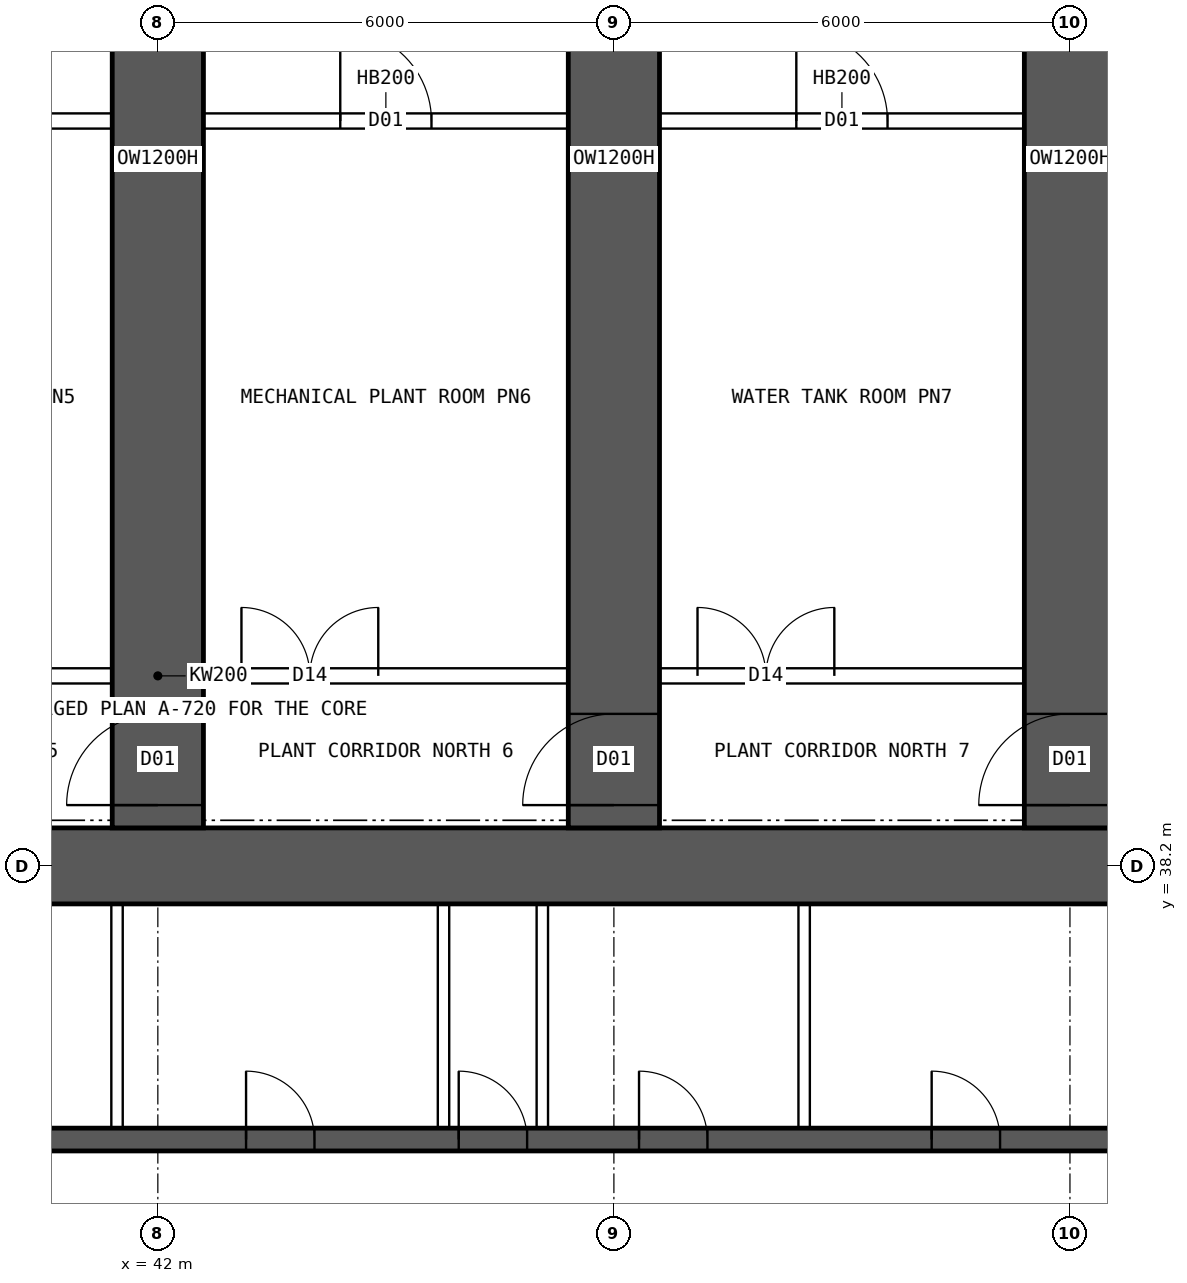
"""IFC4 building model, lengths in metres.
Left out: names, types, materials, properties, quantities, classifications, styles, units other than length and angle.
Written with IfcOpenShell. Run it as: python <this file> out.ifc"""

import sys

from ifc_helpers import new_model, si_unit, direction, frame, frame_2d, origin, place, context, subcontext, project, spatial, rectangle, extrude, element, fill, save


model = new_model("IFC4")
c1 = context("Model", 3, precision=1e-05, world=origin(), true_north=direction((0.0, 1.0)))
c2 = subcontext(c1, "Body", "Model", "MODEL_VIEW")
j1 = project(units=[si_unit("LENGTHUNIT", "METRE"), si_unit("PLANEANGLEUNIT", "RADIAN")], contexts=[c1])
p1 = place(None, origin())
s1 = spatial("IfcSite", under=j1, at=p1, CompositionType="ELEMENT")
p2 = place(p1, origin())
s2 = spatial("IfcBuilding", under=s1, at=p2, CompositionType="ELEMENT")
p3 = place(p2, frame((0.0, 0.0, 68.95)))
s3 = spatial("IfcBuildingStorey", under=s2, at=p3, CompositionType="ELEMENT", Elevation=68.95)
p4 = place(p3, frame((18.0, 38.2, 0.0), z_axis=(0.0, 0.0, 1.0), x_axis=(1.0, 0.0, 0.0)))
e1 = element("IfcWall", 1, at=p4, inside=s3, PredefinedType="SHEAR", context=c2, shape_type="SweptSolid", body=[
    extrude(rectangle(XDim=48.0, YDim=1.0, at=frame_2d((24.0, 0.0))), origin(), (0.0, 0.0, 1.0), 7.2),
])
p5 = place(p3, frame((18.5, 34.6, 0.0), z_axis=(0.0, 0.0, 1.0), x_axis=(1.0, 0.0, 0.0)))
e2 = element("IfcWall", 2, at=p5, inside=s3, PredefinedType="SHEAR", context=c2, shape_type="SweptSolid", body=[
    extrude(rectangle(XDim=47.0, YDim=0.3, at=frame_2d((23.5, 0.0))), origin(), (0.0, 0.0, 1.0), 7.2),
])
p6 = place(p5, frame((0.9, 0.0, 0.0)))
e3 = element("IfcOpeningElement", 3, at=p6, cuts=e2, PredefinedType="OPENING", context=c2, shape_type="SweptSolid", body=[
    extrude(rectangle(XDim=1.1, YDim=2.1, at=frame_2d((0.55, 1.05))), frame((0.0, 0.16, 0.0), z_axis=(0.0, -1.0, 0.0), x_axis=(1.0, 0.0, 0.0)), (0.0, 0.0, 1.0), 0.32),
])
p7 = place(p5, frame((45.0, 0.0, 0.0)))
e4 = element("IfcOpeningElement", 4, at=p7, cuts=e2, PredefinedType="OPENING", context=c2, shape_type="SweptSolid", body=[
    extrude(rectangle(XDim=1.1, YDim=2.1, at=frame_2d((0.55, 1.05))), frame((0.0, 0.16, 0.0), z_axis=(0.0, -1.0, 0.0), x_axis=(1.0, 0.0, 0.0)), (0.0, 0.0, 1.0), 0.32),
])
p8 = place(p5, frame((4.1, 0.0, 0.0)))
e5 = element("IfcOpeningElement", 5, at=p8, cuts=e2, PredefinedType="OPENING", context=c2, shape_type="SweptSolid", body=[
    extrude(rectangle(XDim=0.9, YDim=2.1, at=frame_2d((0.45, 1.05))), frame((0.0, 0.16, 0.0), z_axis=(0.0, -1.0, 0.0), x_axis=(1.0, 0.0, 0.0)), (0.0, 0.0, 1.0), 0.32),
])
p9 = place(p5, frame((42.0, 0.0, 0.0)))
e6 = element("IfcOpeningElement", 6, at=p9, cuts=e2, PredefinedType="OPENING", context=c2, shape_type="SweptSolid", body=[
    extrude(rectangle(XDim=0.9, YDim=2.1, at=frame_2d((0.45, 1.05))), frame((0.0, 0.16, 0.0), z_axis=(0.0, -1.0, 0.0), x_axis=(1.0, 0.0, 0.0)), (0.0, 0.0, 1.0), 0.32),
])
p10 = place(p5, frame((8.875, 0.0, 0.0)))
e7 = element("IfcOpeningElement", 7, at=p10, cuts=e2, PredefinedType="OPENING", context=c2, shape_type="SweptSolid", body=[
    extrude(rectangle(XDim=0.9, YDim=2.1, at=frame_2d((0.45, 1.05))), frame((0.0, 0.16, 0.0), z_axis=(0.0, -1.0, 0.0), x_axis=(1.0, 0.0, 0.0)), (0.0, 0.0, 1.0), 0.32),
])
p11 = place(p5, frame((12.849, 0.0, 0.0)))
e8 = element("IfcOpeningElement", 8, at=p11, cuts=e2, PredefinedType="OPENING", context=c2, shape_type="SweptSolid", body=[
    extrude(rectangle(XDim=0.9, YDim=2.1, at=frame_2d((0.45, 1.05))), frame((0.0, 0.16, 0.0), z_axis=(0.0, -1.0, 0.0), x_axis=(1.0, 0.0, 0.0)), (0.0, 0.0, 1.0), 0.32),
])
p12 = place(p5, frame((16.496, 0.0, 0.0)))
e9 = element("IfcOpeningElement", 9, at=p12, cuts=e2, PredefinedType="OPENING", context=c2, shape_type="SweptSolid", body=[
    extrude(rectangle(XDim=0.9, YDim=2.1, at=frame_2d((0.45, 1.05))), frame((0.0, 0.16, 0.0), z_axis=(0.0, -1.0, 0.0), x_axis=(1.0, 0.0, 0.0)), (0.0, 0.0, 1.0), 0.32),
])
p13 = place(p5, frame((20.255, 0.0, 0.0)))
e10 = element("IfcOpeningElement", 10, at=p13, cuts=e2, PredefinedType="OPENING", context=c2, shape_type="SweptSolid", body=[
    extrude(rectangle(XDim=0.9, YDim=2.1, at=frame_2d((0.45, 1.05))), frame((0.0, 0.16, 0.0), z_axis=(0.0, -1.0, 0.0), x_axis=(1.0, 0.0, 0.0)), (0.0, 0.0, 1.0), 0.32),
])
p14 = place(p5, frame((24.661, 0.0, 0.0)))
e11 = element("IfcOpeningElement", 11, at=p14, cuts=e2, PredefinedType="OPENING", context=c2, shape_type="SweptSolid", body=[
    extrude(rectangle(XDim=0.9, YDim=2.1, at=frame_2d((0.45, 1.05))), frame((0.0, 0.16, 0.0), z_axis=(0.0, -1.0, 0.0), x_axis=(1.0, 0.0, 0.0)), (0.0, 0.0, 1.0), 0.32),
])
p15 = place(p5, frame((27.458, 0.0, 0.0)))
e12 = element("IfcOpeningElement", 12, at=p15, cuts=e2, PredefinedType="OPENING", context=c2, shape_type="SweptSolid", body=[
    extrude(rectangle(XDim=0.9, YDim=2.1, at=frame_2d((0.45, 1.05))), frame((0.0, 0.16, 0.0), z_axis=(0.0, -1.0, 0.0), x_axis=(1.0, 0.0, 0.0)), (0.0, 0.0, 1.0), 0.32),
])
p16 = place(p5, frame((29.831, 0.0, 0.0)))
e13 = element("IfcOpeningElement", 13, at=p16, cuts=e2, PredefinedType="OPENING", context=c2, shape_type="SweptSolid", body=[
    extrude(rectangle(XDim=0.9, YDim=2.1, at=frame_2d((0.45, 1.05))), frame((0.0, 0.16, 0.0), z_axis=(0.0, -1.0, 0.0), x_axis=(1.0, 0.0, 0.0)), (0.0, 0.0, 1.0), 0.32),
])
p17 = place(p5, frame((33.68, 0.0, 0.0)))
e14 = element("IfcOpeningElement", 14, at=p17, cuts=e2, PredefinedType="OPENING", context=c2, shape_type="SweptSolid", body=[
    extrude(rectangle(XDim=0.9, YDim=2.1, at=frame_2d((0.45, 1.05))), frame((0.0, 0.16, 0.0), z_axis=(0.0, -1.0, 0.0), x_axis=(1.0, 0.0, 0.0)), (0.0, 0.0, 1.0), 0.32),
])
p18 = place(p5, frame((37.429, 0.0, 0.0)))
e15 = element("IfcOpeningElement", 15, at=p18, cuts=e2, PredefinedType="OPENING", context=c2, shape_type="SweptSolid", body=[
    extrude(rectangle(XDim=0.9, YDim=2.1, at=frame_2d((0.45, 1.05))), frame((0.0, 0.16, 0.0), z_axis=(0.0, -1.0, 0.0), x_axis=(1.0, 0.0, 0.0)), (0.0, 0.0, 1.0), 0.32),
])
p19 = place(p3, frame((42.0, 38.7, 0.0), z_axis=(0.0, 0.0, 1.0), x_axis=(0.0, 1.0, 0.0)))
e16 = element("IfcWall", 16, at=p19, inside=s3, PredefinedType="SHEAR", context=c2, shape_type="SweptSolid", body=[
    extrude(rectangle(XDim=17.6, YDim=1.2, at=frame_2d((8.8, 0.0))), origin(), (0.0, 0.0, 1.0), 7.2),
])
p20 = place(p19, frame((0.3, 0.0, 0.0)))
e17 = element("IfcOpeningElement", 17, at=p20, cuts=e16, PredefinedType="OPENING", context=c2, shape_type="SweptSolid", body=[
    extrude(rectangle(XDim=1.2, YDim=2.1, at=frame_2d((0.6, 1.05))), frame((0.0, 0.61, 0.0), z_axis=(0.0, -1.0, 0.0), x_axis=(1.0, 0.0, 0.0)), (0.0, 0.0, 1.0), 1.22),
])
p21 = place(p3, frame((48.0, 38.7, 0.0), z_axis=(0.0, 0.0, 1.0), x_axis=(0.0, 1.0, 0.0)))
e18 = element("IfcWall", 18, at=p21, inside=s3, PredefinedType="SHEAR", context=c2, shape_type="SweptSolid", body=[
    extrude(rectangle(XDim=17.6, YDim=1.2, at=frame_2d((8.8, 0.0))), origin(), (0.0, 0.0, 1.0), 7.2),
])
p22 = place(p21, frame((0.3, 0.0, 0.0)))
e19 = element("IfcOpeningElement", 19, at=p22, cuts=e18, PredefinedType="OPENING", context=c2, shape_type="SweptSolid", body=[
    extrude(rectangle(XDim=1.2, YDim=2.1, at=frame_2d((0.6, 1.05))), frame((0.0, 0.61, 0.0), z_axis=(0.0, -1.0, 0.0), x_axis=(1.0, 0.0, 0.0)), (0.0, 0.0, 1.0), 1.22),
])
p23 = place(p3, frame((54.0, 38.7, 0.0), z_axis=(0.0, 0.0, 1.0), x_axis=(0.0, 1.0, 0.0)))
e20 = element("IfcWall", 20, at=p23, inside=s3, PredefinedType="SHEAR", context=c2, shape_type="SweptSolid", body=[
    extrude(rectangle(XDim=17.6, YDim=1.2, at=frame_2d((8.8, 0.0))), origin(), (0.0, 0.0, 1.0), 7.2),
])
p24 = place(p23, frame((0.3, 0.0, 0.0)))
e21 = element("IfcOpeningElement", 21, at=p24, cuts=e20, PredefinedType="OPENING", context=c2, shape_type="SweptSolid", body=[
    extrude(rectangle(XDim=1.2, YDim=2.1, at=frame_2d((0.6, 1.05))), frame((0.0, 0.61, 0.0), z_axis=(0.0, -1.0, 0.0), x_axis=(1.0, 0.0, 0.0)), (0.0, 0.0, 1.0), 1.22),
])
for number, where, z_axis, x_axis in (
    (22, (41.463, 34.75, 0.0), (0.0, 0.0, 1.0), (0.0, 1.0, 0.0)),
    (23, (45.758, 34.75, 0.0), (0.0, 0.0, 1.0), (0.0, 1.0, 0.0)),
    (24, (47.058, 34.75, 0.0), (0.0, 0.0, 1.0), (0.0, 1.0, 0.0)),
    (25, (50.503, 34.75, 0.0), (0.0, 0.0, 1.0), (0.0, 1.0, 0.0)),
):
    element("IfcWall", number, at=place(p3, frame(where, z_axis=z_axis, x_axis=x_axis)), inside=s3, PredefinedType="SOLIDWALL", context=c2, shape_type="SweptSolid", body=[
        extrude(rectangle(XDim=2.95, YDim=0.15, at=frame_2d((1.475, 0.0))), origin(), (0.0, 0.0, 1.0), 6.9),
    ])
p25 = place(p3, frame((15.6, 40.7, 0.0), z_axis=(0.0, 0.0, 1.0), x_axis=(1.0, 0.0, 0.0)))
e26 = element("IfcWall", 26, at=p25, inside=s3, PredefinedType="SOLIDWALL", context=c2, shape_type="SweptSolid", body=[
    extrude(rectangle(XDim=52.8, YDim=0.2, at=frame_2d((26.4, 0.0))), origin(), (0.0, 0.0, 1.0), 6.9),
])
p26 = place(p25, frame((0.6, 0.0, 0.0)))
e27 = element("IfcOpeningElement", 27, at=p26, cuts=e26, PredefinedType="OPENING", context=c2, shape_type="SweptSolid", body=[
    extrude(rectangle(XDim=1.2, YDim=2.1, at=frame_2d((0.6, 1.05))), frame((0.0, 0.11, 0.0), z_axis=(0.0, -1.0, 0.0), x_axis=(1.0, 0.0, 0.0)), (0.0, 0.0, 1.0), 0.22),
])
p27 = place(p25, frame((3.5, 0.0, 0.0)))
e28 = element("IfcOpeningElement", 28, at=p27, cuts=e26, PredefinedType="OPENING", context=c2, shape_type="SweptSolid", body=[
    extrude(rectangle(XDim=1.8, YDim=2.4, at=frame_2d((0.9, 1.2))), frame((0.0, 0.11, 0.0), z_axis=(0.0, -1.0, 0.0), x_axis=(1.0, 0.0, 0.0)), (0.0, 0.0, 1.0), 0.22),
])
p28 = place(p25, frame((9.5, 0.0, 0.0)))
e29 = element("IfcOpeningElement", 29, at=p28, cuts=e26, PredefinedType="OPENING", context=c2, shape_type="SweptSolid", body=[
    extrude(rectangle(XDim=1.8, YDim=2.4, at=frame_2d((0.9, 1.2))), frame((0.0, 0.11, 0.0), z_axis=(0.0, -1.0, 0.0), x_axis=(1.0, 0.0, 0.0)), (0.0, 0.0, 1.0), 0.22),
])
p29 = place(p25, frame((15.5, 0.0, 0.0)))
e30 = element("IfcOpeningElement", 30, at=p29, cuts=e26, PredefinedType="OPENING", context=c2, shape_type="SweptSolid", body=[
    extrude(rectangle(XDim=1.8, YDim=2.4, at=frame_2d((0.9, 1.2))), frame((0.0, 0.11, 0.0), z_axis=(0.0, -1.0, 0.0), x_axis=(1.0, 0.0, 0.0)), (0.0, 0.0, 1.0), 0.22),
])
p30 = place(p25, frame((21.5, 0.0, 0.0)))
e31 = element("IfcOpeningElement", 31, at=p30, cuts=e26, PredefinedType="OPENING", context=c2, shape_type="SweptSolid", body=[
    extrude(rectangle(XDim=1.8, YDim=2.4, at=frame_2d((0.9, 1.2))), frame((0.0, 0.11, 0.0), z_axis=(0.0, -1.0, 0.0), x_axis=(1.0, 0.0, 0.0)), (0.0, 0.0, 1.0), 0.22),
])
p31 = place(p25, frame((27.5, 0.0, 0.0)))
e32 = element("IfcOpeningElement", 32, at=p31, cuts=e26, PredefinedType="OPENING", context=c2, shape_type="SweptSolid", body=[
    extrude(rectangle(XDim=1.8, YDim=2.4, at=frame_2d((0.9, 1.2))), frame((0.0, 0.11, 0.0), z_axis=(0.0, -1.0, 0.0), x_axis=(1.0, 0.0, 0.0)), (0.0, 0.0, 1.0), 0.22),
])
p32 = place(p25, frame((33.5, 0.0, 0.0)))
e33 = element("IfcOpeningElement", 33, at=p32, cuts=e26, PredefinedType="OPENING", context=c2, shape_type="SweptSolid", body=[
    extrude(rectangle(XDim=1.8, YDim=2.4, at=frame_2d((0.9, 1.2))), frame((0.0, 0.11, 0.0), z_axis=(0.0, -1.0, 0.0), x_axis=(1.0, 0.0, 0.0)), (0.0, 0.0, 1.0), 0.22),
])
p33 = place(p25, frame((39.5, 0.0, 0.0)))
e34 = element("IfcOpeningElement", 34, at=p33, cuts=e26, PredefinedType="OPENING", context=c2, shape_type="SweptSolid", body=[
    extrude(rectangle(XDim=1.8, YDim=2.4, at=frame_2d((0.9, 1.2))), frame((0.0, 0.11, 0.0), z_axis=(0.0, -1.0, 0.0), x_axis=(1.0, 0.0, 0.0)), (0.0, 0.0, 1.0), 0.22),
])
p34 = place(p25, frame((45.5, 0.0, 0.0)))
e35 = element("IfcOpeningElement", 35, at=p34, cuts=e26, PredefinedType="OPENING", context=c2, shape_type="SweptSolid", body=[
    extrude(rectangle(XDim=1.8, YDim=2.4, at=frame_2d((0.9, 1.2))), frame((0.0, 0.11, 0.0), z_axis=(0.0, -1.0, 0.0), x_axis=(1.0, 0.0, 0.0)), (0.0, 0.0, 1.0), 0.22),
])
p35 = place(p25, frame((51.5, 0.0, 0.0)))
e36 = element("IfcOpeningElement", 36, at=p35, cuts=e26, PredefinedType="OPENING", context=c2, shape_type="SweptSolid", body=[
    extrude(rectangle(XDim=1.2, YDim=2.1, at=frame_2d((0.6, 1.05))), frame((0.0, 0.11, 0.0), z_axis=(0.0, -1.0, 0.0), x_axis=(1.0, 0.0, 0.0)), (0.0, 0.0, 1.0), 0.22),
])
p36 = place(p3, frame((36.5, 48.0, 0.0), z_axis=(0.0, 0.0, 1.0), x_axis=(1.0, 0.0, 0.0)))
e37 = element("IfcWall", 37, at=p36, inside=s3, PredefinedType="SOLIDWALL", context=c2, shape_type="SweptSolid", body=[
    extrude(rectangle(XDim=5.0, YDim=0.2, at=frame_2d((2.5, 0.0))), origin(), (0.0, 0.0, 1.0), 6.9),
])
p37 = place(p36, frame((1.9, 0.0, 0.0)))
e38 = element("IfcOpeningElement", 38, at=p37, cuts=e37, PredefinedType="OPENING", context=c2, shape_type="SweptSolid", body=[
    extrude(rectangle(XDim=1.2, YDim=2.1, at=frame_2d((0.6, 1.05))), frame((0.0, 0.11, 0.0), z_axis=(0.0, -1.0, 0.0), x_axis=(1.0, 0.0, 0.0)), (0.0, 0.0, 1.0), 0.22),
])
p38 = place(p3, frame((42.5, 48.0, 0.0), z_axis=(0.0, 0.0, 1.0), x_axis=(1.0, 0.0, 0.0)))
e39 = element("IfcWall", 39, at=p38, inside=s3, PredefinedType="SOLIDWALL", context=c2, shape_type="SweptSolid", body=[
    extrude(rectangle(XDim=5.0, YDim=0.2, at=frame_2d((2.5, 0.0))), origin(), (0.0, 0.0, 1.0), 6.9),
])
p39 = place(p38, frame((1.9, 0.0, 0.0)))
e40 = element("IfcOpeningElement", 40, at=p39, cuts=e39, PredefinedType="OPENING", context=c2, shape_type="SweptSolid", body=[
    extrude(rectangle(XDim=1.2, YDim=2.1, at=frame_2d((0.6, 1.05))), frame((0.0, 0.11, 0.0), z_axis=(0.0, -1.0, 0.0), x_axis=(1.0, 0.0, 0.0)), (0.0, 0.0, 1.0), 0.22),
])
p40 = place(p3, frame((48.5, 48.0, 0.0), z_axis=(0.0, 0.0, 1.0), x_axis=(1.0, 0.0, 0.0)))
e41 = element("IfcWall", 41, at=p40, inside=s3, PredefinedType="SOLIDWALL", context=c2, shape_type="SweptSolid", body=[
    extrude(rectangle(XDim=5.0, YDim=0.2, at=frame_2d((2.5, 0.0))), origin(), (0.0, 0.0, 1.0), 6.9),
])
p41 = place(p40, frame((1.9, 0.0, 0.0)))
e42 = element("IfcOpeningElement", 42, at=p41, cuts=e41, PredefinedType="OPENING", context=c2, shape_type="SweptSolid", body=[
    extrude(rectangle(XDim=1.2, YDim=2.1, at=frame_2d((0.6, 1.05))), frame((0.0, 0.11, 0.0), z_axis=(0.0, -1.0, 0.0), x_axis=(1.0, 0.0, 0.0)), (0.0, 0.0, 1.0), 0.22),
])
p42 = place(p14, origin())
e43 = element("IfcDoor", 43, at=p42, inside=s3, OperationType="SINGLE_SWING_LEFT", PredefinedType="DOOR", context=c2, shape_type="SweptSolid", body=[
    extrude(rectangle(XDim=0.9, YDim=2.1, at=frame_2d((0.45, 1.05))), frame((0.0, 0.025, 0.0), z_axis=(0.0, -1.0, 0.0), x_axis=(1.0, 0.0, 0.0)), (0.0, 0.0, 1.0), 0.05),
])
fill(e11, e43)
p43 = place(p15, origin())
e44 = element("IfcDoor", 44, at=p43, inside=s3, OperationType="SINGLE_SWING_LEFT", PredefinedType="DOOR", context=c2, shape_type="SweptSolid", body=[
    extrude(rectangle(XDim=0.9, YDim=2.1, at=frame_2d((0.45, 1.05))), frame((0.0, 0.025, 0.0), z_axis=(0.0, -1.0, 0.0), x_axis=(1.0, 0.0, 0.0)), (0.0, 0.0, 1.0), 0.05),
])
fill(e12, e44)
p44 = place(p16, origin())
e45 = element("IfcDoor", 45, at=p44, inside=s3, OperationType="SINGLE_SWING_LEFT", PredefinedType="DOOR", context=c2, shape_type="SweptSolid", body=[
    extrude(rectangle(XDim=0.9, YDim=2.1, at=frame_2d((0.45, 1.05))), frame((0.0, 0.025, 0.0), z_axis=(0.0, -1.0, 0.0), x_axis=(1.0, 0.0, 0.0)), (0.0, 0.0, 1.0), 0.05),
])
fill(e13, e45)
p45 = place(p17, origin())
e46 = element("IfcDoor", 46, at=p45, inside=s3, OperationType="SINGLE_SWING_LEFT", PredefinedType="DOOR", context=c2, shape_type="SweptSolid", body=[
    extrude(rectangle(XDim=0.9, YDim=2.1, at=frame_2d((0.45, 1.05))), frame((0.0, 0.025, 0.0), z_axis=(0.0, -1.0, 0.0), x_axis=(1.0, 0.0, 0.0)), (0.0, 0.0, 1.0), 0.05),
])
fill(e14, e46)
p46 = place(p39, origin())
e47 = element("IfcDoor", 47, at=p46, inside=s3, OperationType="SINGLE_SWING_LEFT", PredefinedType="DOOR", context=c2, shape_type="SweptSolid", body=[
    extrude(rectangle(XDim=1.2, YDim=2.1, at=frame_2d((0.6, 1.05))), frame((0.0, 0.025, 0.0), z_axis=(0.0, -1.0, 0.0), x_axis=(1.0, 0.0, 0.0)), (0.0, 0.0, 1.0), 0.05),
])
fill(e40, e47)
p47 = place(p41, origin())
e48 = element("IfcDoor", 48, at=p47, inside=s3, OperationType="SINGLE_SWING_LEFT", PredefinedType="DOOR", context=c2, shape_type="SweptSolid", body=[
    extrude(rectangle(XDim=1.2, YDim=2.1, at=frame_2d((0.6, 1.05))), frame((0.0, 0.025, 0.0), z_axis=(0.0, -1.0, 0.0), x_axis=(1.0, 0.0, 0.0)), (0.0, 0.0, 1.0), 0.05),
])
fill(e42, e48)
p48 = place(p31, origin())
e49 = element("IfcDoor", 49, at=p48, inside=s3, OperationType="DOUBLE_DOOR_SINGLE_SWING", PredefinedType="DOOR", context=c2, shape_type="SweptSolid", body=[
    extrude(rectangle(XDim=1.8, YDim=2.4, at=frame_2d((0.9, 1.2))), frame((0.0, 0.025, 0.0), z_axis=(0.0, -1.0, 0.0), x_axis=(1.0, 0.0, 0.0)), (0.0, 0.0, 1.0), 0.05),
])
fill(e32, e49)
p49 = place(p32, origin())
e50 = element("IfcDoor", 50, at=p49, inside=s3, OperationType="DOUBLE_DOOR_SINGLE_SWING", PredefinedType="DOOR", context=c2, shape_type="SweptSolid", body=[
    extrude(rectangle(XDim=1.8, YDim=2.4, at=frame_2d((0.9, 1.2))), frame((0.0, 0.025, 0.0), z_axis=(0.0, -1.0, 0.0), x_axis=(1.0, 0.0, 0.0)), (0.0, 0.0, 1.0), 0.05),
])
fill(e33, e50)
p50 = place(p20, origin())
e51 = element("IfcDoor", 51, at=p50, inside=s3, OperationType="SINGLE_SWING_LEFT", PredefinedType="DOOR", context=c2, shape_type="SweptSolid", body=[
    extrude(rectangle(XDim=1.2, YDim=2.1, at=frame_2d((0.6, 1.05))), frame((0.0, 0.025, 0.0), z_axis=(0.0, -1.0, 0.0), x_axis=(1.0, 0.0, 0.0)), (0.0, 0.0, 1.0), 0.05),
])
fill(e17, e51)
p51 = place(p22, origin())
e52 = element("IfcDoor", 52, at=p51, inside=s3, OperationType="SINGLE_SWING_LEFT", PredefinedType="DOOR", context=c2, shape_type="SweptSolid", body=[
    extrude(rectangle(XDim=1.2, YDim=2.1, at=frame_2d((0.6, 1.05))), frame((0.0, 0.025, 0.0), z_axis=(0.0, -1.0, 0.0), x_axis=(1.0, 0.0, 0.0)), (0.0, 0.0, 1.0), 0.05),
])
fill(e19, e52)
p52 = place(p24, origin())
e53 = element("IfcDoor", 53, at=p52, inside=s3, OperationType="SINGLE_SWING_LEFT", PredefinedType="DOOR", context=c2, shape_type="SweptSolid", body=[
    extrude(rectangle(XDim=1.2, YDim=2.1, at=frame_2d((0.6, 1.05))), frame((0.0, 0.025, 0.0), z_axis=(0.0, -1.0, 0.0), x_axis=(1.0, 0.0, 0.0)), (0.0, 0.0, 1.0), 0.05),
])
fill(e21, e53)
save(model, sys.argv[1])
